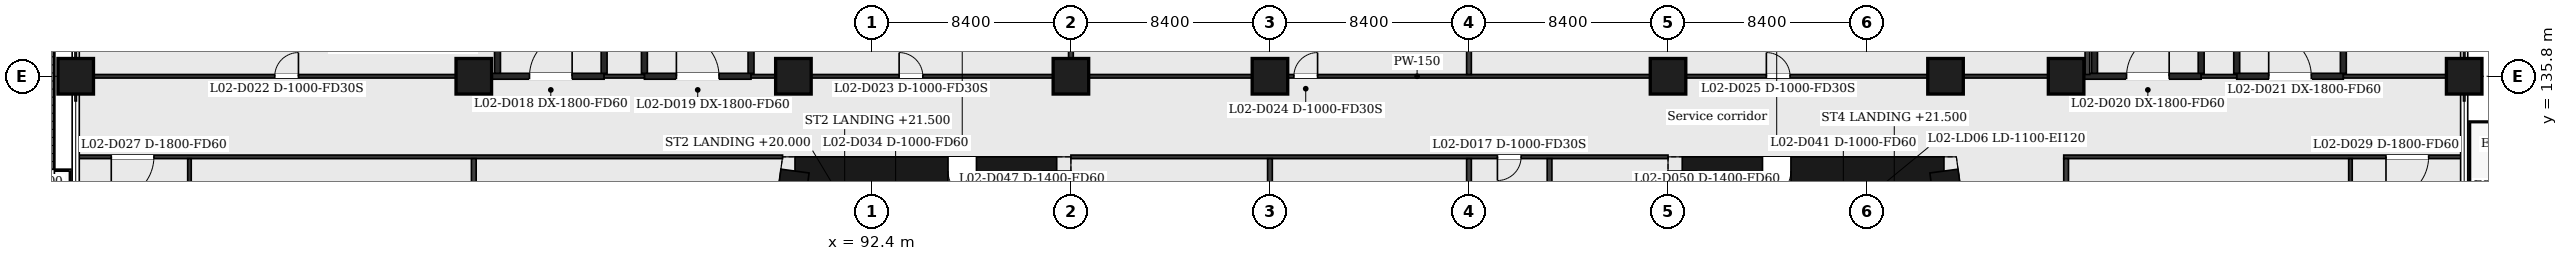
"""IFC4 building model, lengths in metres.
Left out: names, types, materials, properties, quantities, classifications, styles, units other than length and angle.
Written with IfcOpenShell. Run it as: python <this file> out.ifc"""

import sys

from ifc_helpers import new_model, si_unit, direction, frame, frame_2d, origin, origin_2d, place, context, subcontext, project, spatial, rectangle, extrude, element, fill, save


model = new_model("IFC4")
c1 = context("Model", 3, precision=1e-05, world=origin(), true_north=direction((0.0, 1.0)))
c2 = subcontext(c1, "Body", "Model", "MODEL_VIEW")
j1 = project(units=[si_unit("LENGTHUNIT", "METRE"), si_unit("PLANEANGLEUNIT", "RADIAN")], contexts=[c1])
p1 = place(None, origin())
s1 = spatial("IfcSite", under=j1, at=p1, CompositionType="ELEMENT")
p2 = place(p1, origin())
s2 = spatial("IfcBuilding", under=s1, at=p2, CompositionType="ELEMENT")
p3 = place(p2, frame((0.0, 0.0, 17.0)))
s3 = spatial("IfcBuildingStorey", under=s2, at=p3, CompositionType="ELEMENT", Elevation=17.0)
p4 = place(p3, frame((89.156, 131.8, 0.0), z_axis=(0.0, 0.0, 1.0), x_axis=(1.0, 0.0, 0.0)))
e1 = element("IfcWall", 1, at=p4, inside=s3, PredefinedType="SHEAR", context=c2, shape_type="SweptSolid", body=[
    extrude(rectangle(XDim=11.044, YDim=1.2, at=frame_2d((5.522, 0.0))), origin(), (0.0, 0.0, 1.0), 6.0),
])
p5 = place(p4, frame((6.458, 0.0, 0.0)))
e2 = element("IfcOpeningElement", 2, at=p5, cuts=e1, PredefinedType="OPENING", context=c2, shape_type="SweptSolid", body=[
    extrude(rectangle(XDim=1.2, YDim=2.1, at=frame_2d((0.6, 1.05))), frame((0.0, 0.61, 0.0), z_axis=(0.0, -1.0, 0.0), x_axis=(1.0, 0.0, 0.0)), (0.0, 0.0, 1.0), 1.22),
])
p6 = place(p3, frame((100.2, 131.8, 0.0), z_axis=(0.0, 0.0, 1.0), x_axis=(0.0, -1.0, 0.0)))
e3 = element("IfcWall", 3, at=p6, inside=s3, PredefinedType="SHEAR", context=c2, shape_type="SweptSolid", body=[
    extrude(rectangle(XDim=20.8, YDim=1.2, at=frame_2d((10.4, 0.0))), origin(), (0.0, 0.0, 1.0), 6.0),
])
p7 = place(p6, frame((7.65, 0.0, 0.0)))
e4 = element("IfcOpeningElement", 4, at=p7, cuts=e3, PredefinedType="OPENING", context=c2, shape_type="SweptSolid", body=[
    extrude(rectangle(XDim=1.4, YDim=2.1, at=frame_2d((0.7, 1.05))), frame((0.0, 0.61, 0.0), z_axis=(0.0, -1.0, 0.0), x_axis=(1.0, 0.0, 0.0)), (0.0, 0.0, 1.0), 1.22),
])
p8 = place(p3, frame((86.355, 111.0, 0.0), z_axis=(0.0, 0.0, 1.0), x_axis=(0.133413989637, 0.99106039542, 0.0)))
e5 = element("IfcWall", 5, at=p8, inside=s3, PredefinedType="SHEAR", context=c2, shape_type="SweptSolid", body=[
    extrude(rectangle(XDim=20.988, YDim=1.2, at=frame_2d((10.494, 0.0))), origin(), (0.0, 0.0, 1.0), 6.0),
])
p9 = place(p3, frame((126.6, 131.8, 0.0), z_axis=(0.0, 0.0, 1.0), x_axis=(1.0, 0.0, 0.0)))
e6 = element("IfcWall", 6, at=p9, inside=s3, PredefinedType="SHEAR", context=c2, shape_type="SweptSolid", body=[
    extrude(rectangle(XDim=11.044, YDim=1.2, at=frame_2d((5.522, 0.0))), origin(), (0.0, 0.0, 1.0), 6.0),
])
p10 = place(p9, frame((3.386, 0.0, 0.0)))
e7 = element("IfcOpeningElement", 7, at=p10, cuts=e6, PredefinedType="OPENING", context=c2, shape_type="SweptSolid", body=[
    extrude(rectangle(XDim=1.2, YDim=2.1, at=frame_2d((0.6, 1.05))), frame((0.0, 0.61, 0.0), z_axis=(0.0, -1.0, 0.0), x_axis=(1.0, 0.0, 0.0)), (0.0, 0.0, 1.0), 1.22),
])
p11 = place(p3, frame((137.645, 131.8, 0.0), z_axis=(0.0, 0.0, 1.0), x_axis=(0.133413989637, -0.99106039542, 0.0)))
e8 = element("IfcWall", 8, at=p11, inside=s3, PredefinedType="SHEAR", context=c2, shape_type="SweptSolid", body=[
    extrude(rectangle(XDim=20.988, YDim=1.2, at=frame_2d((10.494, 0.0))), origin(), (0.0, 0.0, 1.0), 6.0),
])
p12 = place(p3, frame((126.6, 111.0, 0.0), z_axis=(0.0, 0.0, 1.0), x_axis=(0.0, 1.0, 0.0)))
e9 = element("IfcWall", 9, at=p12, inside=s3, PredefinedType="SHEAR", context=c2, shape_type="SweptSolid", body=[
    extrude(rectangle(XDim=20.8, YDim=1.2, at=frame_2d((10.4, 0.0))), origin(), (0.0, 0.0, 1.0), 6.0),
])
p13 = place(p12, frame((11.75, 0.0, 0.0)))
e10 = element("IfcOpeningElement", 10, at=p13, cuts=e9, PredefinedType="OPENING", context=c2, shape_type="SweptSolid", body=[
    extrude(rectangle(XDim=1.4, YDim=2.1, at=frame_2d((0.7, 1.05))), frame((0.0, 0.61, 0.0), z_axis=(0.0, -1.0, 0.0), x_axis=(1.0, 0.0, 0.0)), (0.0, 0.0, 1.0), 1.22),
])
for number, where, z_axis, x_axis in (
    (11, (58.8, 135.8, 0.0), (0.0, 0.0, 1.0), (1.0, 0.0, 0.0)),
    (12, (75.6, 135.8, 0.0), (0.0, 0.0, 1.0), (1.0, 0.0, 0.0)),
    (13, (89.088, 135.8, 0.0), (0.0, 0.0, 1.0), (1.0, 0.0, 0.0)),
    (14, (100.8, 135.8, 0.0), (0.0, 0.0, 1.0), (1.0, 0.0, 0.0)),
    (15, (109.2, 135.8, 0.0), (0.0, 0.0, 1.0), (1.0, 0.0, 0.0)),
    (16, (126.0, 135.8, 0.0), (0.0, 0.0, 1.0), (1.0, 0.0, 0.0)),
    (17, (137.711, 135.8, 0.0), (0.0, 0.0, 1.0), (1.0, 0.0, 0.0)),
    (18, (142.8, 135.8, 0.0), (0.0, 0.0, 1.0), (1.0, 0.0, 0.0)),
    (19, (159.6, 135.8, 0.0), (0.0, 0.0, 1.0), (1.0, 0.0, 0.0)),
):
    element("IfcColumn", number, at=place(p3, frame(where, z_axis=z_axis, x_axis=x_axis)), inside=s3, PredefinedType="COLUMN", context=c2, shape_type="SweptSolid", body=[
        extrude(rectangle(XDim=1.5, YDim=1.5, at=origin_2d()), origin(), (0.0, 0.0, 1.0), 6.0),
    ])
p14 = place(p3, frame((58.85, 132.4, 0.0), z_axis=(0.0, 0.0, 1.0), x_axis=(1.0, 0.0, 0.0)))
e20 = element("IfcWall", 20, at=p14, inside=s3, PredefinedType="PARTITIONING", context=c2, shape_type="SweptSolid", body=[
    extrude(rectangle(XDim=29.781, YDim=0.15, at=frame_2d((14.891, 0.0))), origin(), (0.0, 0.0, 1.0), 5.5),
])
p15 = place(p14, frame((1.45, 0.0, 0.0)))
e21 = element("IfcOpeningElement", 21, at=p15, cuts=e20, PredefinedType="OPENING", context=c2, shape_type="SweptSolid", body=[
    extrude(rectangle(XDim=1.8, YDim=2.1, at=frame_2d((0.9, 1.05))), frame((0.0, 0.085, 0.0), z_axis=(0.0, -1.0, 0.0), x_axis=(1.0, 0.0, 0.0)), (0.0, 0.0, 1.0), 0.17),
])
p16 = place(p3, frame((100.8, 132.4, 0.0), z_axis=(0.0, 0.0, 1.0), x_axis=(1.0, 0.0, 0.0)))
e22 = element("IfcWall", 22, at=p16, inside=s3, PredefinedType="PARTITIONING", context=c2, shape_type="SweptSolid", body=[
    extrude(rectangle(XDim=25.2, YDim=0.15, at=frame_2d((12.6, 0.0))), origin(), (0.0, 0.0, 1.0), 5.5),
])
p17 = place(p16, frame((18.0, 0.0, 0.0)))
e23 = element("IfcOpeningElement", 23, at=p17, cuts=e22, PredefinedType="OPENING", context=c2, shape_type="SweptSolid", body=[
    extrude(rectangle(XDim=1.0, YDim=2.1, at=frame_2d((0.5, 1.05))), frame((0.0, 0.085, 0.0), z_axis=(0.0, -1.0, 0.0), x_axis=(1.0, 0.0, 0.0)), (0.0, 0.0, 1.0), 0.17),
])
p18 = place(p3, frame((142.7, 132.4, 0.0), z_axis=(0.0, 0.0, 1.0), x_axis=(1.0, 0.0, 0.0)))
e24 = element("IfcWall", 24, at=p18, inside=s3, PredefinedType="PARTITIONING", context=c2, shape_type="SweptSolid", body=[
    extrude(rectangle(XDim=16.85, YDim=0.15, at=frame_2d((8.425, 0.0))), origin(), (0.0, 0.0, 1.0), 5.5),
])
p19 = place(p18, frame((13.6, 0.0, 0.0)))
e25 = element("IfcOpeningElement", 25, at=p19, cuts=e24, PredefinedType="OPENING", context=c2, shape_type="SweptSolid", body=[
    extrude(rectangle(XDim=1.8, YDim=2.1, at=frame_2d((0.9, 1.05))), frame((0.0, 0.085, 0.0), z_axis=(0.0, -1.0, 0.0), x_axis=(1.0, 0.0, 0.0)), (0.0, 0.0, 1.0), 0.17),
])
p20 = place(p3, frame((76.32, 135.8, 0.0), z_axis=(0.0, 0.0, 1.0), x_axis=(1.0, 0.0, 0.0)))
e26 = element("IfcWall", 26, at=p20, inside=s3, PredefinedType="PARTITIONING", context=c2, shape_type="SweptSolid", body=[
    extrude(rectangle(XDim=4.78, YDim=0.25, at=frame_2d((2.39, 0.0))), origin(), (0.0, 0.0, 1.0), 5.5),
])
p21 = place(p20, frame((1.63, 0.0, 0.0)))
e27 = element("IfcOpeningElement", 27, at=p21, cuts=e26, PredefinedType="OPENING", context=c2, shape_type="SweptSolid", body=[
    extrude(rectangle(XDim=1.8, YDim=2.1, at=frame_2d((0.9, 1.05))), frame((0.0, 0.135, 0.0), z_axis=(0.0, -1.0, 0.0), x_axis=(1.0, 0.0, 0.0)), (0.0, 0.0, 1.0), 0.27),
])
p22 = place(p3, frame((82.8, 135.8, 0.0), z_axis=(0.0, 0.0, 1.0), x_axis=(1.0, 0.0, 0.0)))
e28 = element("IfcWall", 28, at=p22, inside=s3, PredefinedType="PARTITIONING", context=c2, shape_type="SweptSolid", body=[
    extrude(rectangle(XDim=4.5, YDim=0.25, at=frame_2d((2.25, 0.0))), origin(), (0.0, 0.0, 1.0), 5.5),
])
p23 = place(p22, frame((1.35, 0.0, 0.0)))
e29 = element("IfcOpeningElement", 29, at=p23, cuts=e28, PredefinedType="OPENING", context=c2, shape_type="SweptSolid", body=[
    extrude(rectangle(XDim=1.8, YDim=2.1, at=frame_2d((0.9, 1.05))), frame((0.0, 0.135, 0.0), z_axis=(0.0, -1.0, 0.0), x_axis=(1.0, 0.0, 0.0)), (0.0, 0.0, 1.0), 0.27),
])
p24 = place(p3, frame((143.52, 135.8, 0.0), z_axis=(0.0, 0.0, 1.0), x_axis=(1.0, 0.0, 0.0)))
e30 = element("IfcWall", 30, at=p24, inside=s3, PredefinedType="PARTITIONING", context=c2, shape_type="SweptSolid", body=[
    extrude(rectangle(XDim=4.98, YDim=0.25, at=frame_2d((2.49, 0.0))), origin(), (0.0, 0.0, 1.0), 5.5),
])
p25 = place(p24, frame((1.83, 0.0, 0.0)))
e31 = element("IfcOpeningElement", 31, at=p25, cuts=e30, PredefinedType="OPENING", context=c2, shape_type="SweptSolid", body=[
    extrude(rectangle(XDim=1.8, YDim=2.1, at=frame_2d((0.9, 1.05))), frame((0.0, 0.135, 0.0), z_axis=(0.0, -1.0, 0.0), x_axis=(1.0, 0.0, 0.0)), (0.0, 0.0, 1.0), 0.27),
])
p26 = place(p3, frame((150.0, 135.8, 0.0), z_axis=(0.0, 0.0, 1.0), x_axis=(1.0, 0.0, 0.0)))
e32 = element("IfcWall", 32, at=p26, inside=s3, PredefinedType="PARTITIONING", context=c2, shape_type="SweptSolid", body=[
    extrude(rectangle(XDim=4.5, YDim=0.25, at=frame_2d((2.25, 0.0))), origin(), (0.0, 0.0, 1.0), 5.5),
])
p27 = place(p26, frame((1.35, 0.0, 0.0)))
e33 = element("IfcOpeningElement", 33, at=p27, cuts=e32, PredefinedType="OPENING", context=c2, shape_type="SweptSolid", body=[
    extrude(rectangle(XDim=1.8, YDim=2.1, at=frame_2d((0.9, 1.05))), frame((0.0, 0.135, 0.0), z_axis=(0.0, -1.0, 0.0), x_axis=(1.0, 0.0, 0.0)), (0.0, 0.0, 1.0), 0.27),
])
p28 = place(p3, frame((58.85, 135.8, 0.0), z_axis=(0.0, 0.0, 1.0), x_axis=(1.0, 0.0, 0.0)))
e34 = element("IfcWall", 34, at=p28, inside=s3, PredefinedType="PARTITIONING", context=c2, shape_type="SweptSolid", body=[
    extrude(rectangle(XDim=17.47, YDim=0.15, at=frame_2d((8.735, 0.0))), origin(), (0.0, 0.0, 1.0), 5.5),
])
p29 = place(p28, frame((8.35, 0.0, 0.0)))
e35 = element("IfcOpeningElement", 35, at=p29, cuts=e34, PredefinedType="OPENING", context=c2, shape_type="SweptSolid", body=[
    extrude(rectangle(XDim=1.0, YDim=2.1, at=frame_2d((0.5, 1.05))), frame((0.0, 0.085, 0.0), z_axis=(0.0, -1.0, 0.0), x_axis=(1.0, 0.0, 0.0)), (0.0, 0.0, 1.0), 0.17),
])
p30 = place(p3, frame((81.1, 135.8, 0.0), z_axis=(0.0, 0.0, 1.0), x_axis=(1.0, 0.0, 0.0)))
e36 = element("IfcWall", 36, at=p30, inside=s3, PredefinedType="PARTITIONING", context=c2, shape_type="SweptSolid", body=[
    extrude(rectangle(XDim=1.7, YDim=0.15, at=frame_2d((0.85, 0.0))), origin(), (0.0, 0.0, 1.0), 5.5),
])
p31 = place(p3, frame((87.3, 135.8, 0.0), z_axis=(0.0, 0.0, 1.0), x_axis=(1.0, 0.0, 0.0)))
e37 = element("IfcWall", 37, at=p31, inside=s3, PredefinedType="PARTITIONING", context=c2, shape_type="SweptSolid", body=[
    extrude(rectangle(XDim=56.22, YDim=0.15, at=frame_2d((28.11, 0.0))), origin(), (0.0, 0.0, 1.0), 5.5),
])
p32 = place(p31, frame((6.25, 0.0, 0.0)))
e38 = element("IfcOpeningElement", 38, at=p32, cuts=e37, PredefinedType="OPENING", context=c2, shape_type="SweptSolid", body=[
    extrude(rectangle(XDim=1.0, YDim=2.1, at=frame_2d((0.5, 1.05))), frame((0.0, 0.085, 0.0), z_axis=(0.0, -1.0, 0.0), x_axis=(1.0, 0.0, 0.0)), (0.0, 0.0, 1.0), 0.17),
])
p33 = place(p31, frame((22.91, 0.0, 0.0)))
e39 = element("IfcOpeningElement", 39, at=p33, cuts=e37, PredefinedType="OPENING", context=c2, shape_type="SweptSolid", body=[
    extrude(rectangle(XDim=1.0, YDim=2.1, at=frame_2d((0.5, 1.05))), frame((0.0, 0.085, 0.0), z_axis=(0.0, -1.0, 0.0), x_axis=(1.0, 0.0, 0.0)), (0.0, 0.0, 1.0), 0.17),
])
p34 = place(p31, frame((42.85, 0.0, 0.0)))
e40 = element("IfcOpeningElement", 40, at=p34, cuts=e37, PredefinedType="OPENING", context=c2, shape_type="SweptSolid", body=[
    extrude(rectangle(XDim=1.0, YDim=2.1, at=frame_2d((0.5, 1.05))), frame((0.0, 0.085, 0.0), z_axis=(0.0, -1.0, 0.0), x_axis=(1.0, 0.0, 0.0)), (0.0, 0.0, 1.0), 0.17),
])
p35 = place(p3, frame((148.5, 135.8, 0.0), z_axis=(0.0, 0.0, 1.0), x_axis=(1.0, 0.0, 0.0)))
e41 = element("IfcWall", 41, at=p35, inside=s3, PredefinedType="PARTITIONING", context=c2, shape_type="SweptSolid", body=[
    extrude(rectangle(XDim=1.5, YDim=0.15, at=frame_2d((0.75, 0.0))), origin(), (0.0, 0.0, 1.0), 5.5),
])
p36 = place(p3, frame((154.5, 135.8, 0.0), z_axis=(0.0, 0.0, 1.0), x_axis=(1.0, 0.0, 0.0)))
e42 = element("IfcWall", 42, at=p36, inside=s3, PredefinedType="PARTITIONING", context=c2, shape_type="SweptSolid", body=[
    extrude(rectangle(XDim=5.05, YDim=0.15, at=frame_2d((2.525, 0.0))), origin(), (0.0, 0.0, 1.0), 5.5),
])
p37 = place(p3, frame((63.6, 110.475, 0.0), z_axis=(0.0, 0.0, 1.0), x_axis=(0.0, 1.0, 0.0)))
e43 = element("IfcWall", 43, at=p37, inside=s3, PredefinedType="PARTITIONING", context=c2, shape_type="SweptSolid", body=[
    extrude(rectangle(XDim=21.85, YDim=0.15, at=frame_2d((10.925, 0.0))), origin(), (0.0, 0.0, 1.0), 5.5),
])
p38 = place(p3, frame((75.6, 110.475, 0.0), z_axis=(0.0, 0.0, 1.0), x_axis=(0.0, 1.0, 0.0)))
e44 = element("IfcWall", 44, at=p38, inside=s3, PredefinedType="PARTITIONING", context=c2, shape_type="SweptSolid", body=[
    extrude(rectangle(XDim=21.85, YDim=0.2, at=frame_2d((10.925, 0.0))), origin(), (0.0, 0.0, 1.0), 5.5),
])
for number, where, z_axis, x_axis in (
    (45, (76.6, 135.925, 0.0), (0.0, 0.0, 1.0), (0.0, 1.0, 0.0)),
    (46, (81.1, 135.925, 0.0), (0.0, 0.0, 1.0), (0.0, 1.0, 0.0)),
    (47, (82.8, 135.925, 0.0), (0.0, 0.0, 1.0), (0.0, 1.0, 0.0)),
    (48, (87.3, 135.925, 0.0), (0.0, 0.0, 1.0), (0.0, 1.0, 0.0)),
):
    element("IfcWall", number, at=place(p3, frame(where, z_axis=z_axis, x_axis=x_axis)), inside=s3, PredefinedType="PARTITIONING", context=c2, shape_type="SweptSolid", body=[
        extrude(rectangle(XDim=8.825, YDim=0.25, at=frame_2d((4.413, 0.0))), origin(), (0.0, 0.0, 1.0), 5.5),
    ])
p39 = place(p3, frame((100.8, 135.875, 0.0), z_axis=(0.0, 0.0, 1.0), x_axis=(0.0, 1.0, 0.0)))
e49 = element("IfcWall", 49, at=p39, inside=s3, PredefinedType="PARTITIONING", context=c2, shape_type="SweptSolid", body=[
    extrude(rectangle(XDim=8.875, YDim=0.2, at=frame_2d((4.438, 0.0))), origin(), (0.0, 0.0, 1.0), 5.5),
])
for number, where, z_axis, x_axis in (
    (50, (109.2, 122.975, 0.0), (0.0, 0.0, 1.0), (0.0, 1.0, 0.0)),
    (51, (117.6, 122.975, 0.0), (0.0, 0.0, 1.0), (0.0, 1.0, 0.0)),
):
    element("IfcWall", number, at=place(p3, frame(where, z_axis=z_axis, x_axis=x_axis)), inside=s3, PredefinedType="PARTITIONING", context=c2, shape_type="SweptSolid", body=[
        extrude(rectangle(XDim=9.35, YDim=0.2, at=frame_2d((4.675, 0.0))), origin(), (0.0, 0.0, 1.0), 5.5),
    ])
p40 = place(p3, frame((117.6, 135.875, 0.0), z_axis=(0.0, 0.0, 1.0), x_axis=(0.0, 1.0, 0.0)))
e52 = element("IfcWall", 52, at=p40, inside=s3, PredefinedType="PARTITIONING", context=c2, shape_type="SweptSolid", body=[
    extrude(rectangle(XDim=8.875, YDim=0.2, at=frame_2d((4.438, 0.0))), origin(), (0.0, 0.0, 1.0), 5.5),
])
p41 = place(p3, frame((121.0, 122.975, 0.0), z_axis=(0.0, 0.0, 1.0), x_axis=(0.0, 1.0, 0.0)))
e53 = element("IfcWall", 53, at=p41, inside=s3, PredefinedType="PARTITIONING", context=c2, shape_type="SweptSolid", body=[
    extrude(rectangle(XDim=9.35, YDim=0.2, at=frame_2d((4.675, 0.0))), origin(), (0.0, 0.0, 1.0), 5.5),
])
p42 = place(p3, frame((142.8, 110.475, 0.0), z_axis=(0.0, 0.0, 1.0), x_axis=(0.0, 1.0, 0.0)))
e54 = element("IfcWall", 54, at=p42, inside=s3, PredefinedType="PARTITIONING", context=c2, shape_type="SweptSolid", body=[
    extrude(rectangle(XDim=21.85, YDim=0.2, at=frame_2d((10.925, 0.0))), origin(), (0.0, 0.0, 1.0), 5.5),
])
p43 = place(p3, frame((143.7, 135.875, 0.0), z_axis=(0.0, 0.0, 1.0), x_axis=(0.0, 1.0, 0.0)))
e55 = element("IfcWall", 55, at=p43, inside=s3, PredefinedType="PARTITIONING", context=c2, shape_type="SweptSolid", body=[
    extrude(rectangle(XDim=8.875, YDim=0.2, at=frame_2d((4.438, 0.0))), origin(), (0.0, 0.0, 1.0), 5.5),
])
for number, where, z_axis, x_axis in (
    (56, (144.0, 135.925, 0.0), (0.0, 0.0, 1.0), (0.0, 1.0, 0.0)),
    (57, (148.5, 135.925, 0.0), (0.0, 0.0, 1.0), (0.0, 1.0, 0.0)),
    (58, (150.0, 135.925, 0.0), (0.0, 0.0, 1.0), (0.0, 1.0, 0.0)),
    (59, (154.5, 135.925, 0.0), (0.0, 0.0, 1.0), (0.0, 1.0, 0.0)),
):
    element("IfcWall", number, at=place(p3, frame(where, z_axis=z_axis, x_axis=x_axis)), inside=s3, PredefinedType="PARTITIONING", context=c2, shape_type="SweptSolid", body=[
        extrude(rectangle(XDim=8.825, YDim=0.25, at=frame_2d((4.413, 0.0))), origin(), (0.0, 0.0, 1.0), 5.5),
    ])
p44 = place(p3, frame((154.8, 110.475, 0.0), z_axis=(0.0, 0.0, 1.0), x_axis=(0.0, 1.0, 0.0)))
e60 = element("IfcWall", 60, at=p44, inside=s3, PredefinedType="PARTITIONING", context=c2, shape_type="SweptSolid", body=[
    extrude(rectangle(XDim=21.85, YDim=0.15, at=frame_2d((10.925, 0.0))), origin(), (0.0, 0.0, 1.0), 5.5),
])
p45 = place(p17, origin())
e61 = element("IfcDoor", 61, at=p45, inside=s3, OperationType="SINGLE_SWING_LEFT", PredefinedType="DOOR", context=c2, shape_type="SweptSolid", body=[
    extrude(rectangle(XDim=1.0, YDim=2.1, at=frame_2d((0.5, 1.05))), frame((0.0, 0.025, 0.0), z_axis=(0.0, -1.0, 0.0), x_axis=(1.0, 0.0, 0.0)), (0.0, 0.0, 1.0), 0.05),
])
fill(e23, e61)
p46 = place(p21, origin())
e62 = element("IfcDoor", 62, at=p46, inside=s3, OperationType="SINGLE_SWING_RIGHT", PredefinedType="DOOR", context=c2, shape_type="SweptSolid", body=[
    extrude(rectangle(XDim=1.8, YDim=2.1, at=frame_2d((0.9, 1.05))), frame((0.0, 0.025, 0.0), z_axis=(0.0, -1.0, 0.0), x_axis=(1.0, 0.0, 0.0)), (0.0, 0.0, 1.0), 0.05),
])
fill(e27, e62)
p47 = place(p23, origin())
e63 = element("IfcDoor", 63, at=p47, inside=s3, OperationType="SINGLE_SWING_LEFT", PredefinedType="DOOR", context=c2, shape_type="SweptSolid", body=[
    extrude(rectangle(XDim=1.8, YDim=2.1, at=frame_2d((0.9, 1.05))), frame((0.0, 0.025, 0.0), z_axis=(0.0, -1.0, 0.0), x_axis=(1.0, 0.0, 0.0)), (0.0, 0.0, 1.0), 0.05),
])
fill(e29, e63)
p48 = place(p25, origin())
e64 = element("IfcDoor", 64, at=p48, inside=s3, OperationType="SINGLE_SWING_RIGHT", PredefinedType="DOOR", context=c2, shape_type="SweptSolid", body=[
    extrude(rectangle(XDim=1.8, YDim=2.1, at=frame_2d((0.9, 1.05))), frame((0.0, 0.025, 0.0), z_axis=(0.0, -1.0, 0.0), x_axis=(1.0, 0.0, 0.0)), (0.0, 0.0, 1.0), 0.05),
])
fill(e31, e64)
p49 = place(p27, origin())
e65 = element("IfcDoor", 65, at=p49, inside=s3, OperationType="SINGLE_SWING_LEFT", PredefinedType="DOOR", context=c2, shape_type="SweptSolid", body=[
    extrude(rectangle(XDim=1.8, YDim=2.1, at=frame_2d((0.9, 1.05))), frame((0.0, 0.025, 0.0), z_axis=(0.0, -1.0, 0.0), x_axis=(1.0, 0.0, 0.0)), (0.0, 0.0, 1.0), 0.05),
])
fill(e33, e65)
p50 = place(p29, origin())
e66 = element("IfcDoor", 66, at=p50, inside=s3, OperationType="SINGLE_SWING_RIGHT", PredefinedType="DOOR", context=c2, shape_type="SweptSolid", body=[
    extrude(rectangle(XDim=1.0, YDim=2.1, at=frame_2d((0.5, 1.05))), frame((0.0, 0.025, 0.0), z_axis=(0.0, -1.0, 0.0), x_axis=(1.0, 0.0, 0.0)), (0.0, 0.0, 1.0), 0.05),
])
fill(e35, e66)
p51 = place(p32, origin())
e67 = element("IfcDoor", 67, at=p51, inside=s3, OperationType="SINGLE_SWING_LEFT", PredefinedType="DOOR", context=c2, shape_type="SweptSolid", body=[
    extrude(rectangle(XDim=1.0, YDim=2.1, at=frame_2d((0.5, 1.05))), frame((0.0, 0.025, 0.0), z_axis=(0.0, -1.0, 0.0), x_axis=(1.0, 0.0, 0.0)), (0.0, 0.0, 1.0), 0.05),
])
fill(e38, e67)
p52 = place(p33, origin())
e68 = element("IfcDoor", 68, at=p52, inside=s3, OperationType="SINGLE_SWING_RIGHT", PredefinedType="DOOR", context=c2, shape_type="SweptSolid", body=[
    extrude(rectangle(XDim=1.0, YDim=2.1, at=frame_2d((0.5, 1.05))), frame((0.0, 0.025, 0.0), z_axis=(0.0, -1.0, 0.0), x_axis=(1.0, 0.0, 0.0)), (0.0, 0.0, 1.0), 0.05),
])
fill(e39, e68)
p53 = place(p34, origin())
e69 = element("IfcDoor", 69, at=p53, inside=s3, OperationType="SINGLE_SWING_LEFT", PredefinedType="DOOR", context=c2, shape_type="SweptSolid", body=[
    extrude(rectangle(XDim=1.0, YDim=2.1, at=frame_2d((0.5, 1.05))), frame((0.0, 0.025, 0.0), z_axis=(0.0, -1.0, 0.0), x_axis=(1.0, 0.0, 0.0)), (0.0, 0.0, 1.0), 0.05),
])
fill(e40, e69)
p54 = place(p15, origin())
e70 = element("IfcDoor", 70, at=p54, inside=s3, OperationType="SINGLE_SWING_LEFT", PredefinedType="DOOR", context=c2, shape_type="SweptSolid", body=[
    extrude(rectangle(XDim=1.8, YDim=2.1, at=frame_2d((0.9, 1.05))), frame((0.0, 0.025, 0.0), z_axis=(0.0, -1.0, 0.0), x_axis=(1.0, 0.0, 0.0)), (0.0, 0.0, 1.0), 0.05),
])
fill(e21, e70)
p55 = place(p19, origin())
e71 = element("IfcDoor", 71, at=p55, inside=s3, OperationType="SINGLE_SWING_LEFT", PredefinedType="DOOR", context=c2, shape_type="SweptSolid", body=[
    extrude(rectangle(XDim=1.8, YDim=2.1, at=frame_2d((0.9, 1.05))), frame((0.0, 0.025, 0.0), z_axis=(0.0, -1.0, 0.0), x_axis=(1.0, 0.0, 0.0)), (0.0, 0.0, 1.0), 0.05),
])
fill(e25, e71)
p56 = place(p5, origin())
e72 = element("IfcDoor", 72, at=p56, inside=s3, OperationType="SINGLE_SWING_RIGHT", PredefinedType="DOOR", context=c2, shape_type="SweptSolid", body=[
    extrude(rectangle(XDim=1.2, YDim=2.1, at=frame_2d((0.6, 1.05))), frame((0.0, 0.025, 0.0), z_axis=(0.0, -1.0, 0.0), x_axis=(1.0, 0.0, 0.0)), (0.0, 0.0, 1.0), 0.05),
])
fill(e2, e72)
p57 = place(p10, origin())
e73 = element("IfcDoor", 73, at=p57, inside=s3, OperationType="SINGLE_SWING_LEFT", PredefinedType="DOOR", context=c2, shape_type="SweptSolid", body=[
    extrude(rectangle(XDim=1.2, YDim=2.1, at=frame_2d((0.6, 1.05))), frame((0.0, 0.025, 0.0), z_axis=(0.0, -1.0, 0.0), x_axis=(1.0, 0.0, 0.0)), (0.0, 0.0, 1.0), 0.05),
])
fill(e7, e73)
save(model, sys.argv[1])
